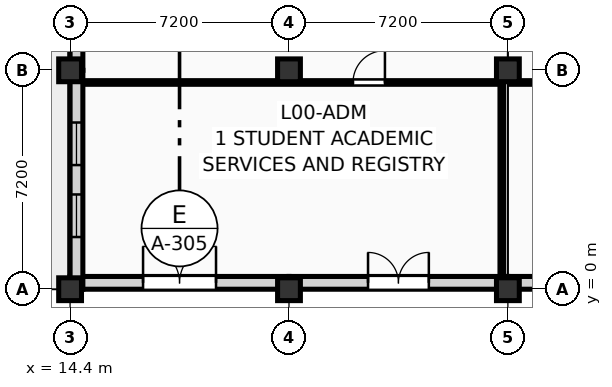
"""IFC4 building model, lengths in metres.
Left out: names, types, materials, properties, quantities, classifications, styles, units other than length and angle.
Written with IfcOpenShell. Run it as: python <this file> out.ifc"""

import sys

from ifc_helpers import new_model, si_unit, direction, frame, frame_2d, origin, origin_2d, place, context, subcontext, project, spatial, rectangle, extrude, element, fill, save


model = new_model("IFC4")
c1 = context("Model", 3, precision=1e-05, world=origin(), true_north=direction((0.0, 1.0)))
c2 = subcontext(c1, "Body", "Model", "MODEL_VIEW")
j1 = project(units=[si_unit("LENGTHUNIT", "METRE"), si_unit("PLANEANGLEUNIT", "RADIAN")], contexts=[c1])
p1 = place(None, origin())
s1 = spatial("IfcSite", under=j1, at=p1, CompositionType="ELEMENT")
p2 = place(p1, origin())
s2 = spatial("IfcBuilding", under=s1, at=p2, CompositionType="ELEMENT")
p3 = place(p2, origin())
s3 = spatial("IfcBuildingStorey", under=s2, at=p3, CompositionType="ELEMENT", Elevation=0.0)
for number, where, z_axis, x_axis in (
    (1, (14.4, 0.0, 0.0), (0.0, 0.0, 1.0), (1.0, 0.0, 0.0)),
    (2, (14.4, 7.2, 0.0), (0.0, 0.0, 1.0), (1.0, 0.0, 0.0)),
    (3, (21.6, 0.0, 0.0), (0.0, 0.0, 1.0), (1.0, 0.0, 0.0)),
    (4, (21.6, 7.2, 0.0), (0.0, 0.0, 1.0), (1.0, 0.0, 0.0)),
    (5, (28.8, 0.0, 0.0), (0.0, 0.0, 1.0), (1.0, 0.0, 0.0)),
    (6, (28.8, 7.2, 0.0), (0.0, 0.0, 1.0), (1.0, 0.0, 0.0)),
):
    element("IfcColumn", number, at=place(p3, frame(where, z_axis=z_axis, x_axis=x_axis)), inside=s3, PredefinedType="COLUMN", context=c2, shape_type="SweptSolid", body=[
        extrude(rectangle(XDim=0.75, YDim=0.75, at=origin_2d()), origin(), (0.0, 0.0, 1.0), 4.5),
    ])
p4 = place(p3, frame((28.8, 0.21, 0.0), z_axis=(0.0, 0.0, 1.0), x_axis=(1.0, 0.0, 0.0)))
e7 = element("IfcWall", 7, at=p4, inside=s3, PredefinedType="SOLIDWALL", context=c2, shape_type="SweptSolid", body=[
    extrude(rectangle(XDim=7.2, YDim=0.42, at=frame_2d((3.6, 0.0))), origin(), (0.0, 0.0, 1.0), 3.62),
])
p5 = place(p4, frame((2.4, 0.0, 0.0)))
e8 = element("IfcOpeningElement", 8, at=p5, cuts=e7, PredefinedType="OPENING", context=c2, shape_type="SweptSolid", body=[
    extrude(rectangle(XDim=2.4, YDim=2.6, at=frame_2d((1.2, 1.3))), frame((0.0, 0.222, 0.0), z_axis=(0.0, -1.0, 0.0), x_axis=(1.0, 0.0, 0.0)), (0.0, 0.0, 1.0), 0.444),
])
p6 = place(p3, frame((21.6, 0.21, 0.0), z_axis=(0.0, 0.0, 1.0), x_axis=(1.0, 0.0, 0.0)))
e9 = element("IfcWall", 9, at=p6, inside=s3, PredefinedType="SOLIDWALL", context=c2, shape_type="SweptSolid", body=[
    extrude(rectangle(XDim=7.2, YDim=0.42, at=frame_2d((3.6, 0.0))), origin(), (0.0, 0.0, 1.0), 3.62),
])
p7 = place(p6, frame((2.6, 0.0, 0.0)))
e10 = element("IfcOpeningElement", 10, at=p7, cuts=e9, PredefinedType="OPENING", context=c2, shape_type="SweptSolid", body=[
    extrude(rectangle(XDim=2.0, YDim=2.4, at=frame_2d((1.0, 1.2))), frame((0.0, 0.222, 0.0), z_axis=(0.0, -1.0, 0.0), x_axis=(1.0, 0.0, 0.0)), (0.0, 0.0, 1.0), 0.444),
])
p8 = place(p3, frame((14.4, 0.21, 0.0), z_axis=(0.0, 0.0, 1.0), x_axis=(1.0, 0.0, 0.0)))
e11 = element("IfcWall", 11, at=p8, inside=s3, PredefinedType="SOLIDWALL", context=c2, shape_type="SweptSolid", body=[
    extrude(rectangle(XDim=7.2, YDim=0.42, at=frame_2d((3.6, 0.0))), origin(), (0.0, 0.0, 1.0), 3.62),
])
p9 = place(p8, frame((2.4, 0.0, 0.0)))
e12 = element("IfcOpeningElement", 12, at=p9, cuts=e11, PredefinedType="OPENING", context=c2, shape_type="SweptSolid", body=[
    extrude(rectangle(XDim=2.4, YDim=2.6, at=frame_2d((1.2, 1.3))), frame((0.0, 0.222, 0.0), z_axis=(0.0, -1.0, 0.0), x_axis=(1.0, 0.0, 0.0)), (0.0, 0.0, 1.0), 0.444),
])
p10 = place(p3, frame((14.61, 0.0, 0.0), z_axis=(0.0, 0.0, 1.0), x_axis=(0.0, 1.0, 0.0)))
e13 = element("IfcWall", 13, at=p10, inside=s3, PredefinedType="SOLIDWALL", context=c2, shape_type="SweptSolid", body=[
    extrude(rectangle(XDim=7.2, YDim=0.42, at=frame_2d((3.6, 0.0))), origin(), (0.0, 0.0, 1.0), 3.62),
])
p11 = place(p10, frame((1.717, 0.0, 0.45)))
e14 = element("IfcOpeningElement", 14, at=p11, cuts=e13, PredefinedType="OPENING", context=c2, shape_type="SweptSolid", body=[
    extrude(rectangle(XDim=1.4, YDim=2.38, at=frame_2d((0.7, 1.19))), frame((0.0, 0.222, 0.0), z_axis=(0.0, -1.0, 0.0), x_axis=(1.0, 0.0, 0.0)), (0.0, 0.0, 1.0), 0.444),
])
p12 = place(p10, frame((4.083, 0.0, 0.45)))
e15 = element("IfcOpeningElement", 15, at=p12, cuts=e13, PredefinedType="OPENING", context=c2, shape_type="SweptSolid", body=[
    extrude(rectangle(XDim=1.4, YDim=2.38, at=frame_2d((0.7, 1.19))), frame((0.0, 0.222, 0.0), z_axis=(0.0, -1.0, 0.0), x_axis=(1.0, 0.0, 0.0)), (0.0, 0.0, 1.0), 0.444),
])
p13 = place(p3, frame((14.61, 7.2, 0.0), z_axis=(0.0, 0.0, 1.0), x_axis=(0.0, 1.0, 0.0)))
e16 = element("IfcWall", 16, at=p13, inside=s3, PredefinedType="SOLIDWALL", context=c2, shape_type="SweptSolid", body=[
    extrude(rectangle(XDim=7.2, YDim=0.42, at=frame_2d((3.6, 0.0))), origin(), (0.0, 0.0, 1.0), 3.62),
])
p14 = place(p13, frame((1.783, 0.0, 0.45)))
e17 = element("IfcOpeningElement", 17, at=p14, cuts=e16, PredefinedType="OPENING", context=c2, shape_type="SweptSolid", body=[
    extrude(rectangle(XDim=1.3, YDim=2.35, at=frame_2d((0.65, 1.175))), frame((0.0, 0.222, 0.0), z_axis=(0.0, -1.0, 0.0), x_axis=(1.0, 0.0, 0.0)), (0.0, 0.0, 1.0), 0.444),
])
p15 = place(p13, frame((4.117, 0.0, 0.45)))
e18 = element("IfcOpeningElement", 18, at=p15, cuts=e16, PredefinedType="OPENING", context=c2, shape_type="SweptSolid", body=[
    extrude(rectangle(XDim=1.3, YDim=2.35, at=frame_2d((0.65, 1.175))), frame((0.0, 0.222, 0.0), z_axis=(0.0, -1.0, 0.0), x_axis=(1.0, 0.0, 0.0)), (0.0, 0.0, 1.0), 0.444),
])
p16 = place(p3, frame((28.6, 0.48, 0.0), z_axis=(0.0, 0.0, 1.0), x_axis=(0.0, 1.0, 0.0)))
e19 = element("IfcWall", 19, at=p16, inside=s3, PredefinedType="PARTITIONING", context=c2, shape_type="SweptSolid", body=[
    extrude(rectangle(XDim=6.24, YDim=0.12, at=frame_2d((3.12, 0.0))), origin(), (0.0, 0.0, 1.0), 3.385),
])
p17 = place(p3, frame((14.88, 6.8, 0.0), z_axis=(0.0, 0.0, 1.0), x_axis=(1.0, 0.0, 0.0)))
e20 = element("IfcWall", 20, at=p17, inside=s3, PredefinedType="PARTITIONING", context=c2, shape_type="SweptSolid", body=[
    extrude(rectangle(XDim=13.64, YDim=0.12, at=frame_2d((6.82, 0.0))), origin(), (0.0, 0.0, 1.0), 3.485),
])
p18 = place(p17, frame((8.826, 0.0, 0.0)))
e21 = element("IfcOpeningElement", 21, at=p18, cuts=e20, PredefinedType="OPENING", context=c2, shape_type="SweptSolid", body=[
    extrude(rectangle(XDim=1.05, YDim=2.18, at=frame_2d((0.525, 1.09))), frame((0.0, 0.072, 0.0), z_axis=(0.0, -1.0, 0.0), x_axis=(1.0, 0.0, 0.0)), (0.0, 0.0, 1.0), 0.144),
])
p19 = place(p3, frame((28.88, 6.8, 0.0), z_axis=(0.0, 0.0, 1.0), x_axis=(1.0, 0.0, 0.0)))
e22 = element("IfcWall", 22, at=p19, inside=s3, PredefinedType="PARTITIONING", context=c2, shape_type="SweptSolid", body=[
    extrude(rectangle(XDim=21.44, YDim=0.12, at=frame_2d((10.72, 0.0))), origin(), (0.0, 0.0, 1.0), 3.485),
])
p20 = place(p19, frame((9.87, 0.0, 0.0)))
e23 = element("IfcOpeningElement", 23, at=p20, cuts=e22, PredefinedType="OPENING", context=c2, shape_type="SweptSolid", body=[
    extrude(rectangle(XDim=1.7, YDim=2.28, at=frame_2d((0.85, 1.14))), frame((0.0, 0.072, 0.0), z_axis=(0.0, -1.0, 0.0), x_axis=(1.0, 0.0, 0.0)), (0.0, 0.0, 1.0), 0.144),
])
p21 = place(p7, origin())
e24 = element("IfcDoor", 24, at=p21, inside=s3, OperationType="DOUBLE_DOOR_SINGLE_SWING", PredefinedType="DOOR", context=c2, shape_type="SweptSolid", body=[
    extrude(rectangle(XDim=2.0, YDim=2.4, at=frame_2d((1.0, 1.2))), frame((0.0, 0.025, 0.0), z_axis=(0.0, -1.0, 0.0), x_axis=(1.0, 0.0, 0.0)), (0.0, 0.0, 1.0), 0.05),
])
fill(e10, e24)
p22 = place(p9, origin())
e25 = element("IfcDoor", 25, at=p22, inside=s3, OperationType="DOUBLE_DOOR_SINGLE_SWING", PredefinedType="DOOR", context=c2, shape_type="SweptSolid", body=[
    extrude(rectangle(XDim=2.4, YDim=2.6, at=frame_2d((1.2, 1.3))), frame((0.0, 0.025, 0.0), z_axis=(0.0, -1.0, 0.0), x_axis=(1.0, 0.0, 0.0)), (0.0, 0.0, 1.0), 0.05),
])
fill(e12, e25)
p23 = place(p11, origin())
e26 = element("IfcWindow", 26, at=p23, inside=s3, PartitioningType="SINGLE_PANEL", PredefinedType="WINDOW", context=c2, shape_type="SweptSolid", body=[
    extrude(rectangle(XDim=1.4, YDim=2.38, at=frame_2d((0.7, 1.19))), frame((0.0, 0.03, 0.0), z_axis=(0.0, -1.0, 0.0), x_axis=(1.0, 0.0, 0.0)), (0.0, 0.0, 1.0), 0.06),
])
fill(e14, e26)
p24 = place(p12, origin())
e27 = element("IfcWindow", 27, at=p24, inside=s3, PartitioningType="SINGLE_PANEL", PredefinedType="WINDOW", context=c2, shape_type="SweptSolid", body=[
    extrude(rectangle(XDim=1.4, YDim=2.38, at=frame_2d((0.7, 1.19))), frame((0.0, 0.03, 0.0), z_axis=(0.0, -1.0, 0.0), x_axis=(1.0, 0.0, 0.0)), (0.0, 0.0, 1.0), 0.06),
])
fill(e15, e27)
p25 = place(p18, origin())
e28 = element("IfcDoor", 28, at=p25, inside=s3, OperationType="SINGLE_SWING_RIGHT", PredefinedType="DOOR", context=c2, shape_type="SweptSolid", body=[
    extrude(rectangle(XDim=1.05, YDim=2.18, at=frame_2d((0.525, 1.09))), frame((0.0, 0.025, 0.0), z_axis=(0.0, -1.0, 0.0), x_axis=(1.0, 0.0, 0.0)), (0.0, 0.0, 1.0), 0.05),
])
fill(e21, e28)
save(model, sys.argv[1])
